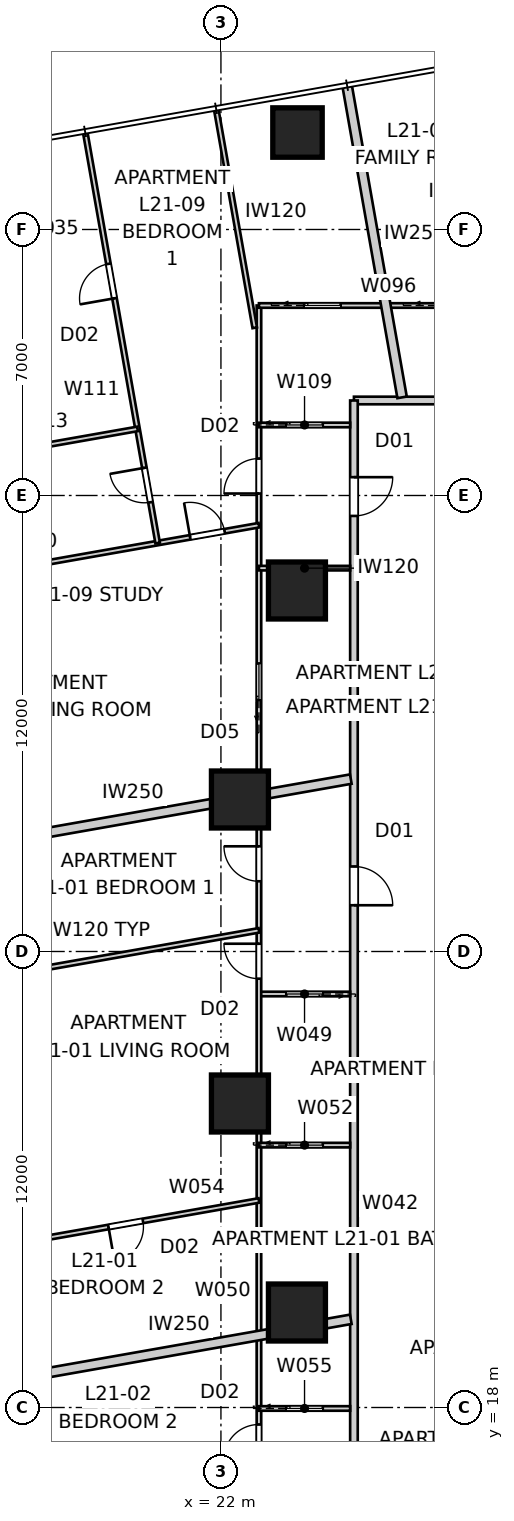
"""IFC4 building model, lengths in metres.
Left out: names, types, materials, properties, quantities, classifications, styles, units other than length and angle.
Written with IfcOpenShell. Run it as: python <this file> out.ifc"""

import sys

from ifc_helpers import new_model, si_unit, direction, frame, frame_2d, origin, origin_2d, place, context, subcontext, project, spatial, rectangle, extrude, element, fill, save


model = new_model("IFC4")
c1 = context("Model", 3, precision=1e-05, world=origin(), true_north=direction((0.0, 1.0)))
c2 = subcontext(c1, "Body", "Model", "MODEL_VIEW")
j1 = project(units=[si_unit("LENGTHUNIT", "METRE"), si_unit("PLANEANGLEUNIT", "RADIAN")], contexts=[c1])
p1 = place(None, origin())
s1 = spatial("IfcSite", under=j1, at=p1, CompositionType="ELEMENT")
p2 = place(p1, origin())
s2 = spatial("IfcBuilding", under=s1, at=p2, CompositionType="ELEMENT")
p3 = place(p2, frame((0.0, 0.0, 79.4)))
s3 = spatial("IfcBuildingStorey", under=s2, at=p3, CompositionType="ELEMENT", Elevation=79.4)
p4 = place(p3, frame((24.015, 51.552, -0.15), z_axis=(0.0, 0.0, 1.0), x_axis=(1.0, 0.0, 0.0)))
e1 = element("IfcColumn", 1, at=p4, inside=s3, PredefinedType="COLUMN", context=c2, shape_type="SweptSolid", body=[
    extrude(rectangle(XDim=1.3, YDim=1.3, at=origin_2d()), origin(), (0.0, 0.0, 1.0), 3.55),
])
for number, where, z_axis, x_axis in (
    (2, (24.0, 39.5, 0.0), (0.0, 0.0, 1.0), (1.0, 0.0, 0.0)),
    (3, (22.5, 34.0, 0.0), (0.0, 0.0, 1.0), (1.0, 0.0, 0.0)),
    (4, (22.5, 26.0, 0.0), (0.0, 0.0, 1.0), (1.0, 0.0, 0.0)),
    (5, (24.0, 20.5, 0.0), (0.0, 0.0, 1.0), (1.0, 0.0, 0.0)),
):
    element("IfcColumn", number, at=place(p3, frame(where, z_axis=z_axis, x_axis=x_axis)), inside=s3, PredefinedType="COLUMN", context=c2, shape_type="SweptSolid", body=[
        extrude(rectangle(XDim=1.5, YDim=1.5, at=origin_2d()), origin(), (0.0, 0.0, 1.0), 3.4),
    ])
p5 = place(p3, frame((54.5, 44.5, 0.0), z_axis=(0.0, 0.0, 1.0), x_axis=(-1.0, 0.0, 0.0)))
e6 = element("IfcWall", 6, at=p5, inside=s3, PredefinedType="PARTITIONING", context=c2, shape_type="SweptSolid", body=[
    extrude(rectangle(XDim=29.0, YDim=0.2, at=frame_2d((14.5, 0.0))), origin(), (0.0, 0.0, 1.0), 3.25),
])
p6 = place(p5, frame((10.129, 0.0, 0.0)))
e7 = element("IfcOpeningElement", 7, at=p6, cuts=e6, PredefinedType="OPENING", context=c2, shape_type="SweptSolid", body=[
    extrude(rectangle(XDim=1.02, YDim=2.34, at=frame_2d((0.51, 1.17))), frame((0.0, 0.11, 0.0), z_axis=(0.0, -1.0, 0.0), x_axis=(1.0, 0.0, 0.0)), (0.0, 0.0, 1.0), 0.22),
])
p7 = place(p5, frame((3.065, 0.0, 0.0)))
e8 = element("IfcOpeningElement", 8, at=p7, cuts=e6, PredefinedType="OPENING", context=c2, shape_type="SweptSolid", body=[
    extrude(rectangle(XDim=1.02, YDim=2.1, at=frame_2d((0.51, 1.05))), frame((0.0, 0.11, 0.0), z_axis=(0.0, -1.0, 0.0), x_axis=(1.0, 0.0, 0.0)), (0.0, 0.0, 1.0), 0.22),
])
p8 = place(p3, frame((25.5, 44.5, 0.0), z_axis=(0.0, 0.0, 1.0), x_axis=(0.0, -1.0, 0.0)))
e9 = element("IfcWall", 9, at=p8, inside=s3, PredefinedType="PARTITIONING", context=c2, shape_type="SweptSolid", body=[
    extrude(rectangle(XDim=29.0, YDim=0.2, at=frame_2d((14.5, 0.0))), origin(), (0.0, 0.0, 1.0), 3.25),
])
p9 = place(p8, frame((12.263, 0.0, 0.0)))
e10 = element("IfcOpeningElement", 10, at=p9, cuts=e9, PredefinedType="OPENING", context=c2, shape_type="SweptSolid", body=[
    extrude(rectangle(XDim=1.02, YDim=2.34, at=frame_2d((0.51, 1.17))), frame((0.0, 0.11, 0.0), z_axis=(0.0, -1.0, 0.0), x_axis=(1.0, 0.0, 0.0)), (0.0, 0.0, 1.0), 0.22),
])
p10 = place(p8, frame((2.018, 0.0, 0.0)))
e11 = element("IfcOpeningElement", 11, at=p10, cuts=e9, PredefinedType="OPENING", context=c2, shape_type="SweptSolid", body=[
    extrude(rectangle(XDim=1.02, YDim=2.34, at=frame_2d((0.51, 1.17))), frame((0.0, 0.11, 0.0), z_axis=(0.0, -1.0, 0.0), x_axis=(1.0, 0.0, 0.0)), (0.0, 0.0, 1.0), 0.22),
])
p11 = place(p3, frame((25.318, 52.797, 0.0), z_axis=(0.0, 0.0, 1.0), x_axis=(0.173651756605, -0.984807121942, 0.0)))
e12 = element("IfcWall", 12, at=p11, inside=s3, PredefinedType="PARTITIONING", context=c2, shape_type="SweptSolid", body=[
    extrude(rectangle(XDim=8.341, YDim=0.25, at=frame_2d((4.171, 0.0))), origin(), (0.0, 0.0, 1.0), 3.25),
])
p12 = place(p3, frame((14.164, 32.552, 0.0), z_axis=(0.0, 0.0, 1.0), x_axis=(0.98481000304, 0.173635416642, 0.0)))
e13 = element("IfcWall", 13, at=p12, inside=s3, PredefinedType="PARTITIONING", context=c2, shape_type="SweptSolid", body=[
    extrude(rectangle(XDim=11.427, YDim=0.25, at=frame_2d((5.713, 0.0))), origin(), (0.0, 0.0, 1.0), 3.25),
])
p13 = place(p3, frame((16.595, 18.765, 0.0), z_axis=(0.0, 0.0, 1.0), x_axis=(0.984806596137, 0.173654738504, 0.0)))
e14 = element("IfcWall", 14, at=p13, inside=s3, PredefinedType="PARTITIONING", context=c2, shape_type="SweptSolid", body=[
    extrude(rectangle(XDim=8.958, YDim=0.25, at=frame_2d((4.479, 0.0))), origin(), (0.0, 0.0, 1.0), 3.25),
])
p14 = place(p3, frame((25.4, 28.882, 0.0), z_axis=(0.0, 0.0, 1.0), x_axis=(-1.0, 0.0, 0.0)))
e15 = element("IfcWall", 15, at=p14, inside=s3, PredefinedType="PARTITIONING", context=c2, shape_type="SweptSolid", body=[
    extrude(rectangle(XDim=2.4, YDim=0.12, at=frame_2d((1.2, 0.0))), origin(), (0.0, 0.0, 1.0), 3.25),
])
p15 = place(p14, frame((0.72, 0.0, 0.0)))
e16 = element("IfcOpeningElement", 16, at=p15, cuts=e15, PredefinedType="OPENING", context=c2, shape_type="SweptSolid", body=[
    extrude(rectangle(XDim=0.96, YDim=2.1, at=frame_2d((0.48, 1.05))), frame((0.0, 0.07, 0.0), z_axis=(0.0, -1.0, 0.0), x_axis=(1.0, 0.0, 0.0)), (0.0, 0.0, 1.0), 0.14),
])
p16 = place(p3, frame((23.0, 13.0, 0.0), z_axis=(0.0, 0.0, 1.0), x_axis=(0.0, 1.0, 0.0)))
e17 = element("IfcWall", 17, at=p16, inside=s3, PredefinedType="PARTITIONING", context=c2, shape_type="SweptSolid", body=[
    extrude(rectangle(XDim=34.0, YDim=0.12, at=frame_2d((17.0, 0.0))), origin(), (0.0, 0.0, 1.0), 2.55),
])
p17 = place(p16, frame((18.848, 0.0, 0.0)))
e18 = element("IfcOpeningElement", 18, at=p17, cuts=e17, PredefinedType="OPENING", context=c2, shape_type="SweptSolid", body=[
    extrude(rectangle(XDim=0.92, YDim=2.34, at=frame_2d((0.46, 1.17))), frame((0.0, 0.07, 0.0), z_axis=(0.0, -1.0, 0.0), x_axis=(1.0, 0.0, 0.0)), (0.0, 0.0, 1.0), 0.14),
])
p18 = place(p16, frame((16.284, 0.0, 0.0)))
e19 = element("IfcOpeningElement", 19, at=p18, cuts=e17, PredefinedType="OPENING", context=c2, shape_type="SweptSolid", body=[
    extrude(rectangle(XDim=0.92, YDim=2.34, at=frame_2d((0.46, 1.17))), frame((0.0, 0.07, 0.0), z_axis=(0.0, -1.0, 0.0), x_axis=(1.0, 0.0, 0.0)), (0.0, 0.0, 1.0), 0.14),
])
p19 = place(p16, frame((29.052, 0.0, 0.0)))
e20 = element("IfcOpeningElement", 20, at=p19, cuts=e17, PredefinedType="OPENING", context=c2, shape_type="SweptSolid", body=[
    extrude(rectangle(XDim=0.92, YDim=2.34, at=frame_2d((0.46, 1.17))), frame((0.0, 0.07, 0.0), z_axis=(0.0, -1.0, 0.0), x_axis=(1.0, 0.0, 0.0)), (0.0, 0.0, 1.0), 0.14),
])
p20 = place(p16, frame((1.196, 0.0, 0.0)))
e21 = element("IfcOpeningElement", 21, at=p20, cuts=e17, PredefinedType="OPENING", context=c2, shape_type="SweptSolid", body=[
    extrude(rectangle(XDim=0.92, YDim=2.34, at=frame_2d((0.46, 1.17))), frame((0.0, 0.07, 0.0), z_axis=(0.0, -1.0, 0.0), x_axis=(1.0, 0.0, 0.0)), (0.0, 0.0, 1.0), 0.14),
])
p21 = place(p16, frame((3.633, 0.0, 0.0)))
e22 = element("IfcOpeningElement", 22, at=p21, cuts=e17, PredefinedType="OPENING", context=c2, shape_type="SweptSolid", body=[
    extrude(rectangle(XDim=0.92, YDim=2.34, at=frame_2d((0.46, 1.17))), frame((0.0, 0.07, 0.0), z_axis=(0.0, -1.0, 0.0), x_axis=(1.0, 0.0, 0.0)), (0.0, 0.0, 1.0), 0.14),
])
p22 = place(p16, frame((23.619, 0.0, 0.0)))
e23 = element("IfcOpeningElement", 23, at=p22, cuts=e17, PredefinedType="OPENING", context=c2, shape_type="SweptSolid", body=[
    extrude(rectangle(XDim=0.96, YDim=2.1, at=frame_2d((0.48, 1.05))), frame((0.0, 0.07, 0.0), z_axis=(0.0, -1.0, 0.0), x_axis=(1.0, 0.0, 0.0)), (0.0, 0.0, 1.0), 0.14),
])
p23 = place(p3, frame((23.0, 24.905, 0.0), z_axis=(0.0, 0.0, 1.0), x_axis=(1.0, 0.0, 0.0)))
e24 = element("IfcWall", 24, at=p23, inside=s3, PredefinedType="PARTITIONING", context=c2, shape_type="SweptSolid", body=[
    extrude(rectangle(XDim=2.4, YDim=0.12, at=frame_2d((1.2, 0.0))), origin(), (0.0, 0.0, 1.0), 3.25),
])
p24 = place(p23, frame((0.72, 0.0, 0.0)))
e25 = element("IfcOpeningElement", 25, at=p24, cuts=e24, PredefinedType="OPENING", context=c2, shape_type="SweptSolid", body=[
    extrude(rectangle(XDim=0.96, YDim=2.1, at=frame_2d((0.48, 1.05))), frame((0.0, 0.07, 0.0), z_axis=(0.0, -1.0, 0.0), x_axis=(1.0, 0.0, 0.0)), (0.0, 0.0, 1.0), 0.14),
])
p25 = place(p3, frame((14.812, 29.113, 0.0), z_axis=(0.0, 0.0, 1.0), x_axis=(0.984807787824, 0.173647980238, 0.0)))
e26 = element("IfcWall", 26, at=p25, inside=s3, PredefinedType="PARTITIONING", context=c2, shape_type="SweptSolid", body=[
    extrude(rectangle(XDim=8.315, YDim=0.12, at=frame_2d((4.157, 0.0))), origin(), (0.0, 0.0, 1.0), 3.25),
])
p26 = place(p3, frame((23.0, 23.448, 0.0), z_axis=(0.0, 0.0, 1.0), x_axis=(-0.984809234282, -0.173639776761, 0.0)))
e27 = element("IfcWall", 27, at=p26, inside=s3, PredefinedType="PARTITIONING", context=c2, shape_type="SweptSolid", body=[
    extrude(rectangle(XDim=7.081, YDim=0.12, at=frame_2d((3.541, 0.0))), origin(), (0.0, 0.0, 1.0), 3.25),
])
p27 = place(p26, frame((3.1, 0.0, 0.0)))
e28 = element("IfcOpeningElement", 28, at=p27, cuts=e27, PredefinedType="OPENING", context=c2, shape_type="SweptSolid", body=[
    extrude(rectangle(XDim=0.92, YDim=2.34, at=frame_2d((0.46, 1.17))), frame((0.0, 0.07, 0.0), z_axis=(0.0, -1.0, 0.0), x_axis=(1.0, 0.0, 0.0)), (0.0, 0.0, 1.0), 0.14),
])
p28 = place(p3, frame((23.0, 17.975, 0.0), z_axis=(0.0, 0.0, 1.0), x_axis=(1.0, 0.0, 0.0)))
e29 = element("IfcWall", 29, at=p28, inside=s3, PredefinedType="PARTITIONING", context=c2, shape_type="SweptSolid", body=[
    extrude(rectangle(XDim=2.4, YDim=0.12, at=frame_2d((1.2, 0.0))), origin(), (0.0, 0.0, 1.0), 3.25),
])
p29 = place(p28, frame((0.72, 0.0, 0.0)))
e30 = element("IfcOpeningElement", 30, at=p29, cuts=e29, PredefinedType="OPENING", context=c2, shape_type="SweptSolid", body=[
    extrude(rectangle(XDim=0.96, YDim=2.1, at=frame_2d((0.48, 1.05))), frame((0.0, 0.07, 0.0), z_axis=(0.0, -1.0, 0.0), x_axis=(1.0, 0.0, 0.0)), (0.0, 0.0, 1.0), 0.14),
])
p30 = place(p3, frame((23.0, 47.0, 0.0), z_axis=(0.0, 0.0, 1.0), x_axis=(1.0, 0.0, 0.0)))
e31 = element("IfcWall", 31, at=p30, inside=s3, PredefinedType="PARTITIONING", context=c2, shape_type="SweptSolid", body=[
    extrude(rectangle(XDim=24.771, YDim=0.12, at=frame_2d((12.386, 0.0))), origin(), (0.0, 0.0, 1.0), 2.55),
])
p31 = place(p30, frame((21.825, 0.0, 0.0)))
e32 = element("IfcOpeningElement", 32, at=p31, cuts=e31, PredefinedType="OPENING", context=c2, shape_type="SweptSolid", body=[
    extrude(rectangle(XDim=0.92, YDim=2.34, at=frame_2d((0.46, 1.17))), frame((0.0, 0.07, 0.0), z_axis=(0.0, -1.0, 0.0), x_axis=(1.0, 0.0, 0.0)), (0.0, 0.0, 1.0), 0.14),
])
p32 = place(p30, frame((11.135, 0.0, 0.0)))
e33 = element("IfcOpeningElement", 33, at=p32, cuts=e31, PredefinedType="OPENING", context=c2, shape_type="SweptSolid", body=[
    extrude(rectangle(XDim=0.96, YDim=2.1, at=frame_2d((0.48, 1.05))), frame((0.0, 0.07, 0.0), z_axis=(0.0, -1.0, 0.0), x_axis=(1.0, 0.0, 0.0)), (0.0, 0.0, 1.0), 0.14),
])
p33 = place(p30, frame((1.19, 0.0, 0.0)))
e34 = element("IfcOpeningElement", 34, at=p33, cuts=e31, PredefinedType="OPENING", context=c2, shape_type="SweptSolid", body=[
    extrude(rectangle(XDim=0.96, YDim=2.1, at=frame_2d((0.48, 1.05))), frame((0.0, 0.07, 0.0), z_axis=(0.0, -1.0, 0.0), x_axis=(1.0, 0.0, 0.0)), (0.0, 0.0, 1.0), 0.14),
])
p34 = place(p30, frame((8.342, 0.0, 0.0)))
e35 = element("IfcOpeningElement", 35, at=p34, cuts=e31, PredefinedType="OPENING", context=c2, shape_type="SweptSolid", body=[
    extrude(rectangle(XDim=0.96, YDim=2.1, at=frame_2d((0.48, 1.05))), frame((0.0, 0.07, 0.0), z_axis=(0.0, -1.0, 0.0), x_axis=(1.0, 0.0, 0.0)), (0.0, 0.0, 1.0), 0.14),
])
p35 = place(p30, frame((4.663, 0.0, 0.0)))
e36 = element("IfcOpeningElement", 36, at=p35, cuts=e31, PredefinedType="OPENING", context=c2, shape_type="SweptSolid", body=[
    extrude(rectangle(XDim=0.96, YDim=2.1, at=frame_2d((0.48, 1.05))), frame((0.0, 0.07, 0.0), z_axis=(0.0, -1.0, 0.0), x_axis=(1.0, 0.0, 0.0)), (0.0, 0.0, 1.0), 0.14),
])
p36 = place(p3, frame((25.4, 40.088, 0.0), z_axis=(0.0, 0.0, 1.0), x_axis=(-1.0, 0.0, 0.0)))
e37 = element("IfcWall", 37, at=p36, inside=s3, PredefinedType="PARTITIONING", context=c2, shape_type="SweptSolid", body=[
    extrude(rectangle(XDim=2.4, YDim=0.12, at=frame_2d((1.2, 0.0))), origin(), (0.0, 0.0, 1.0), 3.25),
])
p37 = place(p3, frame((23.0, 43.856, 0.0), z_axis=(0.0, 0.0, 1.0), x_axis=(1.0, 0.0, 0.0)))
e38 = element("IfcWall", 38, at=p37, inside=s3, PredefinedType="PARTITIONING", context=c2, shape_type="SweptSolid", body=[
    extrude(rectangle(XDim=2.4, YDim=0.12, at=frame_2d((1.2, 0.0))), origin(), (0.0, 0.0, 1.0), 3.25),
])
p38 = place(p37, frame((0.72, 0.0, 0.0)))
e39 = element("IfcOpeningElement", 39, at=p38, cuts=e38, PredefinedType="OPENING", context=c2, shape_type="SweptSolid", body=[
    extrude(rectangle(XDim=0.96, YDim=2.1, at=frame_2d((0.48, 1.05))), frame((0.0, 0.07, 0.0), z_axis=(0.0, -1.0, 0.0), x_axis=(1.0, 0.0, 0.0)), (0.0, 0.0, 1.0), 0.14),
])
p39 = place(p3, frame((12.988, 39.453, 0.0), z_axis=(0.0, 0.0, 1.0), x_axis=(0.984807724889, 0.173648337162, 0.0)))
e40 = element("IfcWall", 40, at=p39, inside=s3, PredefinedType="PARTITIONING", context=c2, shape_type="SweptSolid", body=[
    extrude(rectangle(XDim=10.167, YDim=0.12, at=frame_2d((5.083, 0.0))), origin(), (0.0, 0.0, 1.0), 2.638),
])
p40 = place(p39, frame((8.328, 0.0, 0.0)))
e41 = element("IfcOpeningElement", 41, at=p40, cuts=e40, PredefinedType="OPENING", context=c2, shape_type="SweptSolid", body=[
    extrude(rectangle(XDim=0.92, YDim=2.34, at=frame_2d((0.46, 1.17))), frame((0.0, 0.07, 0.0), z_axis=(0.0, -1.0, 0.0), x_axis=(1.0, 0.0, 0.0)), (0.0, 0.0, 1.0), 0.14),
])
p41 = place(p3, frame((20.335, 40.749, 0.0), z_axis=(0.0, 0.0, 1.0), x_axis=(-0.173639194339, 0.984809336973, 0.0)))
e42 = element("IfcWall", 42, at=p41, inside=s3, PredefinedType="PARTITIONING", context=c2, shape_type="SweptSolid", body=[
    extrude(rectangle(XDim=10.96, YDim=0.12, at=frame_2d((5.48, 0.0))), origin(), (0.0, 0.0, 1.0), 3.25),
])
p42 = place(p41, frame((6.54, 0.0, 0.0)))
e43 = element("IfcOpeningElement", 43, at=p42, cuts=e42, PredefinedType="OPENING", context=c2, shape_type="SweptSolid", body=[
    extrude(rectangle(XDim=0.92, YDim=2.34, at=frame_2d((0.46, 1.17))), frame((0.0, 0.07, 0.0), z_axis=(0.0, -1.0, 0.0), x_axis=(1.0, 0.0, 0.0)), (0.0, 0.0, 1.0), 0.14),
])
p43 = place(p41, frame((1.09, 0.0, 0.0)))
e44 = element("IfcOpeningElement", 44, at=p43, cuts=e42, PredefinedType="OPENING", context=c2, shape_type="SweptSolid", body=[
    extrude(rectangle(XDim=0.92, YDim=2.34, at=frame_2d((0.46, 1.17))), frame((0.0, 0.07, 0.0), z_axis=(0.0, -1.0, 0.0), x_axis=(1.0, 0.0, 0.0)), (0.0, 0.0, 1.0), 0.14),
])
p44 = place(p3, frame((21.878, 52.15, 0.0), z_axis=(0.0, 0.0, 1.0), x_axis=(0.173634707655, -0.984810128044, 0.0)))
e45 = element("IfcWall", 45, at=p44, inside=s3, PredefinedType="PARTITIONING", context=c2, shape_type="SweptSolid", body=[
    extrude(rectangle(XDim=5.825, YDim=0.12, at=frame_2d((2.913, 0.0))), origin(), (0.0, 0.0, 1.0), 2.638),
])
p45 = place(p3, frame((12.458, 42.457, 0.0), z_axis=(0.0, 0.0, 1.0), x_axis=(0.984807929323, 0.173647177755, 0.0)))
e46 = element("IfcWall", 46, at=p45, inside=s3, PredefinedType="PARTITIONING", context=c2, shape_type="SweptSolid", body=[
    extrude(rectangle(XDim=7.46, YDim=0.12, at=frame_2d((3.73, 0.0))), origin(), (0.0, 0.0, 1.0), 3.25),
])
p46 = place(p45, frame((1.55, 0.0, 0.0)))
e47 = element("IfcOpeningElement", 47, at=p46, cuts=e46, PredefinedType="OPENING", context=c2, shape_type="SweptSolid", body=[
    extrude(rectangle(XDim=0.92, YDim=2.34, at=frame_2d((0.46, 1.17))), frame((0.0, 0.07, 0.0), z_axis=(0.0, -1.0, 0.0), x_axis=(1.0, 0.0, 0.0)), (0.0, 0.0, 1.0), 0.14),
])
p47 = place(p9, origin())
e48 = element("IfcDoor", 48, at=p47, inside=s3, OperationType="SINGLE_SWING_RIGHT", PredefinedType="DOOR", context=c2, shape_type="SweptSolid", body=[
    extrude(rectangle(XDim=1.02, YDim=2.34, at=frame_2d((0.51, 1.17))), frame((0.0, 0.025, 0.0), z_axis=(0.0, -1.0, 0.0), x_axis=(1.0, 0.0, 0.0)), (0.0, 0.0, 1.0), 0.05),
])
fill(e10, e48)
p48 = place(p10, origin())
e49 = element("IfcDoor", 49, at=p48, inside=s3, OperationType="SINGLE_SWING_LEFT", PredefinedType="DOOR", context=c2, shape_type="SweptSolid", body=[
    extrude(rectangle(XDim=1.02, YDim=2.34, at=frame_2d((0.51, 1.17))), frame((0.0, 0.025, 0.0), z_axis=(0.0, -1.0, 0.0), x_axis=(1.0, 0.0, 0.0)), (0.0, 0.0, 1.0), 0.05),
])
fill(e11, e49)
p49 = place(p17, origin())
e50 = element("IfcDoor", 50, at=p49, inside=s3, OperationType="SINGLE_SWING_RIGHT", PredefinedType="DOOR", context=c2, shape_type="SweptSolid", body=[
    extrude(rectangle(XDim=0.92, YDim=2.34, at=frame_2d((0.46, 1.17))), frame((0.0, 0.025, 0.0), z_axis=(0.0, -1.0, 0.0), x_axis=(1.0, 0.0, 0.0)), (0.0, 0.0, 1.0), 0.05),
])
fill(e18, e50)
p50 = place(p15, origin())
e51 = element("IfcDoor", 51, at=p50, inside=s3, OperationType="SLIDING_TO_LEFT", PredefinedType="DOOR", context=c2, shape_type="SweptSolid", body=[
    extrude(rectangle(XDim=0.96, YDim=2.1, at=frame_2d((0.48, 1.05))), frame((0.0, 0.025, 0.0), z_axis=(0.0, -1.0, 0.0), x_axis=(1.0, 0.0, 0.0)), (0.0, 0.0, 1.0), 0.05),
])
fill(e16, e51)
p51 = place(p18, origin())
e52 = element("IfcDoor", 52, at=p51, inside=s3, OperationType="SINGLE_SWING_RIGHT", PredefinedType="DOOR", context=c2, shape_type="SweptSolid", body=[
    extrude(rectangle(XDim=0.92, YDim=2.34, at=frame_2d((0.46, 1.17))), frame((0.0, 0.025, 0.0), z_axis=(0.0, -1.0, 0.0), x_axis=(1.0, 0.0, 0.0)), (0.0, 0.0, 1.0), 0.05),
])
fill(e19, e52)
p52 = place(p19, origin())
e53 = element("IfcDoor", 53, at=p52, inside=s3, OperationType="SINGLE_SWING_LEFT", PredefinedType="DOOR", context=c2, shape_type="SweptSolid", body=[
    extrude(rectangle(XDim=0.92, YDim=2.34, at=frame_2d((0.46, 1.17))), frame((0.0, 0.025, 0.0), z_axis=(0.0, -1.0, 0.0), x_axis=(1.0, 0.0, 0.0)), (0.0, 0.0, 1.0), 0.05),
])
fill(e20, e53)
p53 = place(p38, origin())
e54 = element("IfcDoor", 54, at=p53, inside=s3, OperationType="SLIDING_TO_LEFT", PredefinedType="DOOR", context=c2, shape_type="SweptSolid", body=[
    extrude(rectangle(XDim=0.96, YDim=2.1, at=frame_2d((0.48, 1.05))), frame((0.0, 0.025, 0.0), z_axis=(0.0, -1.0, 0.0), x_axis=(1.0, 0.0, 0.0)), (0.0, 0.0, 1.0), 0.05),
])
fill(e39, e54)
p54 = place(p29, origin())
e55 = element("IfcDoor", 55, at=p54, inside=s3, OperationType="SLIDING_TO_LEFT", PredefinedType="DOOR", context=c2, shape_type="SweptSolid", body=[
    extrude(rectangle(XDim=0.96, YDim=2.1, at=frame_2d((0.48, 1.05))), frame((0.0, 0.025, 0.0), z_axis=(0.0, -1.0, 0.0), x_axis=(1.0, 0.0, 0.0)), (0.0, 0.0, 1.0), 0.05),
])
fill(e30, e55)
p55 = place(p21, origin())
e56 = element("IfcDoor", 56, at=p55, inside=s3, OperationType="SINGLE_SWING_LEFT", PredefinedType="DOOR", context=c2, shape_type="SweptSolid", body=[
    extrude(rectangle(XDim=0.92, YDim=2.34, at=frame_2d((0.46, 1.17))), frame((0.0, 0.025, 0.0), z_axis=(0.0, -1.0, 0.0), x_axis=(1.0, 0.0, 0.0)), (0.0, 0.0, 1.0), 0.05),
])
fill(e22, e56)
p56 = place(p24, origin())
e57 = element("IfcDoor", 57, at=p56, inside=s3, OperationType="SLIDING_TO_LEFT", PredefinedType="DOOR", context=c2, shape_type="SweptSolid", body=[
    extrude(rectangle(XDim=0.96, YDim=2.1, at=frame_2d((0.48, 1.05))), frame((0.0, 0.025, 0.0), z_axis=(0.0, -1.0, 0.0), x_axis=(1.0, 0.0, 0.0)), (0.0, 0.0, 1.0), 0.05),
])
fill(e25, e57)
p57 = place(p27, origin())
e58 = element("IfcDoor", 58, at=p57, inside=s3, OperationType="SINGLE_SWING_RIGHT", PredefinedType="DOOR", context=c2, shape_type="SweptSolid", body=[
    extrude(rectangle(XDim=0.92, YDim=2.34, at=frame_2d((0.46, 1.17))), frame((0.0, 0.025, 0.0), z_axis=(0.0, -1.0, 0.0), x_axis=(1.0, 0.0, 0.0)), (0.0, 0.0, 1.0), 0.05),
])
fill(e28, e58)
p58 = place(p33, origin())
e59 = element("IfcDoor", 59, at=p58, inside=s3, OperationType="SLIDING_TO_LEFT", PredefinedType="DOOR", context=c2, shape_type="SweptSolid", body=[
    extrude(rectangle(XDim=0.96, YDim=2.1, at=frame_2d((0.48, 1.05))), frame((0.0, 0.025, 0.0), z_axis=(0.0, -1.0, 0.0), x_axis=(1.0, 0.0, 0.0)), (0.0, 0.0, 1.0), 0.05),
])
fill(e34, e59)
p59 = place(p42, origin())
e60 = element("IfcDoor", 60, at=p59, inside=s3, OperationType="SINGLE_SWING_LEFT", PredefinedType="DOOR", context=c2, shape_type="SweptSolid", body=[
    extrude(rectangle(XDim=0.92, YDim=2.34, at=frame_2d((0.46, 1.17))), frame((0.0, 0.025, 0.0), z_axis=(0.0, -1.0, 0.0), x_axis=(1.0, 0.0, 0.0)), (0.0, 0.0, 1.0), 0.05),
])
fill(e43, e60)
p60 = place(p43, origin())
e61 = element("IfcDoor", 61, at=p60, inside=s3, OperationType="SINGLE_SWING_RIGHT", PredefinedType="DOOR", context=c2, shape_type="SweptSolid", body=[
    extrude(rectangle(XDim=0.92, YDim=2.34, at=frame_2d((0.46, 1.17))), frame((0.0, 0.025, 0.0), z_axis=(0.0, -1.0, 0.0), x_axis=(1.0, 0.0, 0.0)), (0.0, 0.0, 1.0), 0.05),
])
fill(e44, e61)
p61 = place(p40, origin())
e62 = element("IfcDoor", 62, at=p61, inside=s3, OperationType="SINGLE_SWING_LEFT", PredefinedType="DOOR", context=c2, shape_type="SweptSolid", body=[
    extrude(rectangle(XDim=0.92, YDim=2.34, at=frame_2d((0.46, 1.17))), frame((0.0, 0.025, 0.0), z_axis=(0.0, -1.0, 0.0), x_axis=(1.0, 0.0, 0.0)), (0.0, 0.0, 1.0), 0.05),
])
fill(e41, e62)
p62 = place(p22, origin())
e63 = element("IfcDoor", 63, at=p62, inside=s3, OperationType="SLIDING_TO_LEFT", PredefinedType="DOOR", context=c2, shape_type="SweptSolid", body=[
    extrude(rectangle(XDim=0.96, YDim=2.1, at=frame_2d((0.48, 1.05))), frame((0.0, 0.025, 0.0), z_axis=(0.0, -1.0, 0.0), x_axis=(1.0, 0.0, 0.0)), (0.0, 0.0, 1.0), 0.05),
])
fill(e23, e63)
save(model, sys.argv[1])
